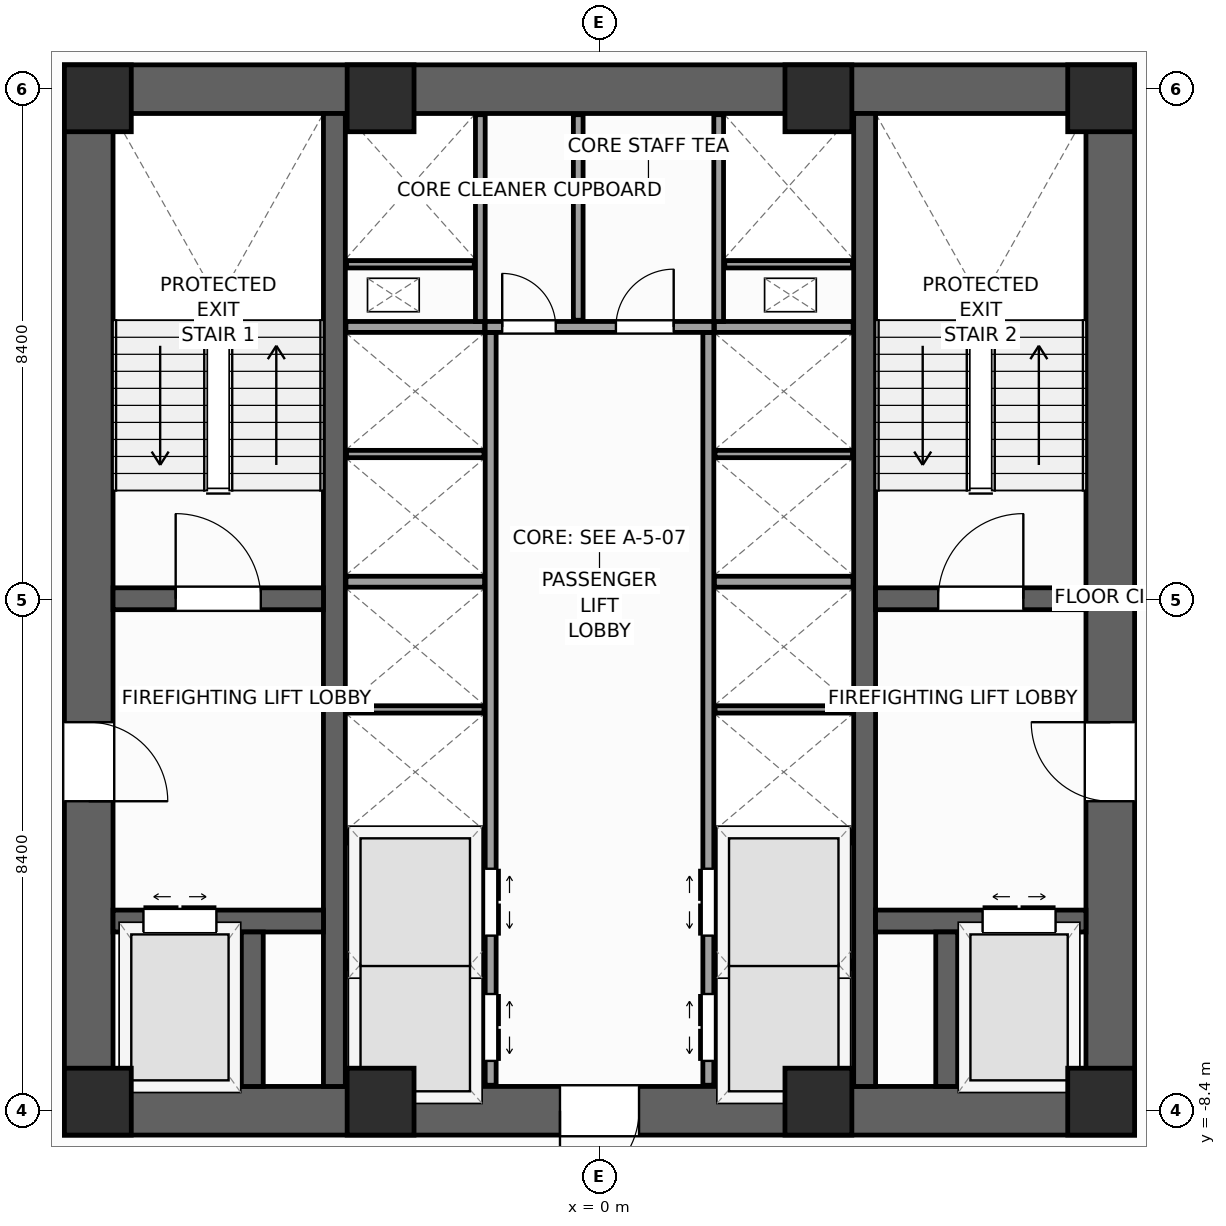
"""IFC4 building model, lengths in metres.
Left out: names, types, materials, properties, quantities, classifications, styles, units other than length and angle.
Written with IfcOpenShell. Run it as: python <this file> out.ifc"""

import sys

from ifc_helpers import new_model, si_unit, direction, frame, frame_2d, origin, origin_2d, place, context, subcontext, project, spatial, rectangle, extrude, source, transform, mapped, element, fill, save


model = new_model("IFC4")
c1 = context("Model", 3, precision=1e-05, world=origin(), true_north=direction((0.0, 1.0)))
c2 = subcontext(c1, "Body", "Model", "MODEL_VIEW")
j1 = project(units=[si_unit("LENGTHUNIT", "METRE"), si_unit("PLANEANGLEUNIT", "RADIAN")], contexts=[c1])
p1 = place(None, origin())
s1 = spatial("IfcSite", under=j1, at=p1, CompositionType="ELEMENT")
p2 = place(p1, origin())
s2 = spatial("IfcBuilding", under=s1, at=p2, CompositionType="ELEMENT")
p3 = place(p2, frame((0.0, 0.0, 26.0)))
s3 = spatial("IfcBuildingStorey", under=s2, at=p3, CompositionType="ELEMENT", Elevation=26.0)
p4 = place(p3, frame((-8.8, -8.4, 0.0), z_axis=(0.0, 0.0, 1.0), x_axis=(1.0, 0.0, 0.0)))
e1 = element("IfcWall", 1, at=p4, inside=s3, PredefinedType="SHEAR", context=c2, shape_type="SweptSolid", body=[
    extrude(rectangle(XDim=17.6, YDim=0.8, at=frame_2d((8.8, 0.0))), origin(), (0.0, 0.0, 1.0), 4.0),
])
p5 = place(p4, frame((8.15, 0.0, 0.0)))
e2 = element("IfcOpeningElement", 2, at=p5, cuts=e1, PredefinedType="OPENING", context=c2, shape_type="SweptSolid", body=[
    extrude(rectangle(XDim=1.3, YDim=2.2, at=frame_2d((0.65, 1.1))), frame((0.0, 0.41, 0.0), z_axis=(0.0, -1.0, 0.0), x_axis=(1.0, 0.0, 0.0)), (0.0, 0.0, 1.0), 0.82),
])
p6 = place(p3, frame((-8.8, 8.4, 0.0), z_axis=(0.0, 0.0, 1.0), x_axis=(1.0, 0.0, 0.0)))
e3 = element("IfcWall", 3, at=p6, inside=s3, PredefinedType="SHEAR", context=c2, shape_type="SweptSolid", body=[
    extrude(rectangle(XDim=17.6, YDim=0.8, at=frame_2d((8.8, 0.0))), origin(), (0.0, 0.0, 1.0), 4.0),
])
p7 = place(p3, frame((-8.4, -8.0, 0.0), z_axis=(0.0, 0.0, 1.0), x_axis=(0.0, 1.0, 0.0)))
e4 = element("IfcWall", 4, at=p7, inside=s3, PredefinedType="SHEAR", context=c2, shape_type="SweptSolid", body=[
    extrude(rectangle(XDim=16.0, YDim=0.8, at=frame_2d((8.0, 0.0))), origin(), (0.0, 0.0, 1.0), 4.0),
])
p8 = place(p7, frame((4.69, 0.0, 0.0)))
e5 = element("IfcOpeningElement", 5, at=p8, cuts=e4, PredefinedType="OPENING", context=c2, shape_type="SweptSolid", body=[
    extrude(rectangle(XDim=1.3, YDim=2.2, at=frame_2d((0.65, 1.1))), frame((0.0, 0.41, 0.0), z_axis=(0.0, -1.0, 0.0), x_axis=(1.0, 0.0, 0.0)), (0.0, 0.0, 1.0), 0.82),
])
p9 = place(p3, frame((8.4, -8.0, 0.0), z_axis=(0.0, 0.0, 1.0), x_axis=(0.0, 1.0, 0.0)))
e6 = element("IfcWall", 6, at=p9, inside=s3, PredefinedType="SHEAR", context=c2, shape_type="SweptSolid", body=[
    extrude(rectangle(XDim=16.0, YDim=0.8, at=frame_2d((8.0, 0.0))), origin(), (0.0, 0.0, 1.0), 4.0),
])
p10 = place(p9, frame((4.69, 0.0, 0.0)))
e7 = element("IfcOpeningElement", 7, at=p10, cuts=e6, PredefinedType="OPENING", context=c2, shape_type="SweptSolid", body=[
    extrude(rectangle(XDim=1.3, YDim=2.2, at=frame_2d((0.65, 1.1))), frame((0.0, 0.41, 0.0), z_axis=(0.0, -1.0, 0.0), x_axis=(1.0, 0.0, 0.0)), (0.0, 0.0, 1.0), 0.82),
])
for number, where, z_axis, x_axis in (
    (8, (-4.36, -8.0, 0.0), (0.0, 0.0, 1.0), (0.0, 1.0, 0.0)),
    (9, (4.36, -8.0, 0.0), (0.0, 0.0, 1.0), (0.0, 1.0, 0.0)),
):
    element("IfcWall", number, at=place(p3, frame(where, z_axis=z_axis, x_axis=x_axis)), inside=s3, PredefinedType="SHEAR", context=c2, shape_type="SweptSolid", body=[
        extrude(rectangle(XDim=16.0, YDim=0.36, at=frame_2d((8.0, 0.0))), origin(), (0.0, 0.0, 1.0), 4.0),
    ])
p11 = place(p3, frame((-8.0, 0.02, 0.0), z_axis=(0.0, 0.0, 1.0), x_axis=(1.0, 0.0, 0.0)))
e10 = element("IfcWall", 10, at=p11, inside=s3, PredefinedType="SHEAR", context=c2, shape_type="SweptSolid", body=[
    extrude(rectangle(XDim=3.46, YDim=0.36, at=frame_2d((1.73, 0.0))), origin(), (0.0, 0.0, 1.0), 4.0),
])
p12 = place(p11, frame((1.03, 0.0, 0.0)))
e11 = element("IfcOpeningElement", 11, at=p12, cuts=e10, PredefinedType="OPENING", context=c2, shape_type="SweptSolid", body=[
    extrude(rectangle(XDim=1.4, YDim=2.2, at=frame_2d((0.7, 1.1))), frame((0.0, 0.19, 0.0), z_axis=(0.0, -1.0, 0.0), x_axis=(1.0, 0.0, 0.0)), (0.0, 0.0, 1.0), 0.38),
])
p13 = place(p3, frame((4.54, 0.02, 0.0), z_axis=(0.0, 0.0, 1.0), x_axis=(1.0, 0.0, 0.0)))
e12 = element("IfcWall", 12, at=p13, inside=s3, PredefinedType="SHEAR", context=c2, shape_type="SweptSolid", body=[
    extrude(rectangle(XDim=3.46, YDim=0.36, at=frame_2d((1.73, 0.0))), origin(), (0.0, 0.0, 1.0), 4.0),
])
p14 = place(p13, frame((1.03, 0.0, 0.0)))
e13 = element("IfcOpeningElement", 13, at=p14, cuts=e12, PredefinedType="OPENING", context=c2, shape_type="SweptSolid", body=[
    extrude(rectangle(XDim=1.4, YDim=2.2, at=frame_2d((0.7, 1.1))), frame((0.0, 0.19, 0.0), z_axis=(0.0, -1.0, 0.0), x_axis=(1.0, 0.0, 0.0)), (0.0, 0.0, 1.0), 0.38),
])
p15 = place(p3, frame((-8.0, -5.28, 0.0), z_axis=(0.0, 0.0, 1.0), x_axis=(1.0, 0.0, 0.0)))
e14 = element("IfcWall", 14, at=p15, inside=s3, PredefinedType="SHEAR", context=c2, shape_type="SweptSolid", body=[
    extrude(rectangle(XDim=3.46, YDim=0.36, at=frame_2d((1.73, 0.0))), origin(), (0.0, 0.0, 1.0), 4.0),
])
p16 = place(p15, frame((0.5, 0.0, 0.0)))
e15 = element("IfcOpeningElement", 15, at=p16, cuts=e14, PredefinedType="OPENING", context=c2, shape_type="SweptSolid", body=[
    extrude(rectangle(XDim=1.2, YDim=2.25, at=frame_2d((0.6, 1.125))), frame((0.0, 0.19, 0.0), z_axis=(0.0, -1.0, 0.0), x_axis=(1.0, 0.0, 0.0)), (0.0, 0.0, 1.0), 0.38),
])
p17 = place(p3, frame((4.54, -5.28, 0.0), z_axis=(0.0, 0.0, 1.0), x_axis=(1.0, 0.0, 0.0)))
e16 = element("IfcWall", 16, at=p17, inside=s3, PredefinedType="SHEAR", context=c2, shape_type="SweptSolid", body=[
    extrude(rectangle(XDim=3.46, YDim=0.36, at=frame_2d((1.73, 0.0))), origin(), (0.0, 0.0, 1.0), 4.0),
])
p18 = place(p17, frame((1.76, 0.0, 0.0)))
e17 = element("IfcOpeningElement", 17, at=p18, cuts=e16, PredefinedType="OPENING", context=c2, shape_type="SweptSolid", body=[
    extrude(rectangle(XDim=1.2, YDim=2.25, at=frame_2d((0.6, 1.125))), frame((0.0, 0.19, 0.0), z_axis=(0.0, -1.0, 0.0), x_axis=(1.0, 0.0, 0.0)), (0.0, 0.0, 1.0), 0.38),
])
for number, where, z_axis, x_axis in (
    (18, (-5.71, -8.0, 0.0), (0.0, 0.0, 1.0), (0.0, 1.0, 0.0)),
    (19, (5.71, -8.0, 0.0), (0.0, 0.0, 1.0), (0.0, 1.0, 0.0)),
):
    element("IfcWall", number, at=place(p3, frame(where, z_axis=z_axis, x_axis=x_axis)), inside=s3, PredefinedType="SHEAR", context=c2, shape_type="SweptSolid", body=[
        extrude(rectangle(XDim=2.54, YDim=0.36, at=frame_2d((1.27, 0.0))), origin(), (0.0, 0.0, 1.0), 4.0),
    ])
m1 = source(origin(), c2, "Body", "SweptSolid", [
    extrude(rectangle(XDim=1.1, YDim=1.1, at=origin_2d()), origin(), (0.0, 0.0, 1.0), 4.0),
])
for number, where, z_axis, x_axis in (
    (20, (-8.25, -8.25, 0.0), (0.0, 0.0, 1.0), (1.0, 0.0, 0.0)),
    (21, (8.25, -8.25, 0.0), (0.0, 0.0, 1.0), (1.0, 0.0, 0.0)),
    (22, (8.25, 8.25, 0.0), (0.0, 0.0, 1.0), (1.0, 0.0, 0.0)),
    (23, (-8.25, 8.25, 0.0), (0.0, 0.0, 1.0), (1.0, 0.0, 0.0)),
    (24, (-3.6, -8.25, 0.0), (0.0, 0.0, 1.0), (1.0, 0.0, 0.0)),
    (25, (3.6, -8.25, 0.0), (0.0, 0.0, 1.0), (1.0, 0.0, 0.0)),
    (26, (-3.6, 8.25, 0.0), (0.0, 0.0, 1.0), (1.0, 0.0, 0.0)),
    (27, (3.6, 8.25, 0.0), (0.0, 0.0, 1.0), (1.0, 0.0, 0.0)),
):
    element("IfcColumn", number, at=place(p3, frame(where, z_axis=z_axis, x_axis=x_axis)), inside=s3, PredefinedType="PILASTER", context=c2, shape_type="MappedRepresentation", body=[
        mapped(m1, transform((0.0, 0.0, 0.0), scale=1.0)),
    ])
p19 = place(p3, frame((-1.79, -7.98, 0.0), z_axis=(0.0, 0.0, 1.0), x_axis=(0.0, 1.0, 0.0)))
e28 = element("IfcWall", 28, at=p19, inside=s3, PredefinedType="PARTITIONING", context=c2, shape_type="SweptSolid", body=[
    extrude(rectangle(XDim=12.38, YDim=0.18, at=frame_2d((6.19, 0.0))), origin(), (0.0, 0.0, 1.0), 3.72),
])
p20 = place(p19, frame((0.4, 0.0, 0.0)))
e29 = element("IfcOpeningElement", 29, at=p20, cuts=e28, PredefinedType="OPENING", context=c2, shape_type="SweptSolid", body=[
    extrude(rectangle(XDim=1.1, YDim=2.2, at=frame_2d((0.55, 1.1))), frame((0.0, 0.1, 0.0), z_axis=(0.0, -1.0, 0.0), x_axis=(1.0, 0.0, 0.0)), (0.0, 0.0, 1.0), 0.2),
])
p21 = place(p19, frame((2.46, 0.0, 0.0)))
e30 = element("IfcOpeningElement", 30, at=p21, cuts=e28, PredefinedType="OPENING", context=c2, shape_type="SweptSolid", body=[
    extrude(rectangle(XDim=1.1, YDim=2.2, at=frame_2d((0.55, 1.1))), frame((0.0, 0.1, 0.0), z_axis=(0.0, -1.0, 0.0), x_axis=(1.0, 0.0, 0.0)), (0.0, 0.0, 1.0), 0.2),
])
p22 = place(p3, frame((1.79, -7.98, 0.0), z_axis=(0.0, 0.0, 1.0), x_axis=(0.0, 1.0, 0.0)))
e31 = element("IfcWall", 31, at=p22, inside=s3, PredefinedType="PARTITIONING", context=c2, shape_type="SweptSolid", body=[
    extrude(rectangle(XDim=12.38, YDim=0.18, at=frame_2d((6.19, 0.0))), origin(), (0.0, 0.0, 1.0), 3.72),
])
p23 = place(p22, frame((0.4, 0.0, 0.0)))
e32 = element("IfcOpeningElement", 32, at=p23, cuts=e31, PredefinedType="OPENING", context=c2, shape_type="SweptSolid", body=[
    extrude(rectangle(XDim=1.1, YDim=2.2, at=frame_2d((0.55, 1.1))), frame((0.0, 0.1, 0.0), z_axis=(0.0, -1.0, 0.0), x_axis=(1.0, 0.0, 0.0)), (0.0, 0.0, 1.0), 0.2),
])
p24 = place(p22, frame((2.46, 0.0, 0.0)))
e33 = element("IfcOpeningElement", 33, at=p24, cuts=e31, PredefinedType="OPENING", context=c2, shape_type="SweptSolid", body=[
    extrude(rectangle(XDim=1.1, YDim=2.2, at=frame_2d((0.55, 1.1))), frame((0.0, 0.1, 0.0), z_axis=(0.0, -1.0, 0.0), x_axis=(1.0, 0.0, 0.0)), (0.0, 0.0, 1.0), 0.2),
])
p25 = place(p3, frame((-1.88, 4.49, 0.0), z_axis=(0.0, 0.0, 1.0), x_axis=(1.0, 0.0, 0.0)))
e34 = element("IfcWall", 34, at=p25, inside=s3, PredefinedType="PARTITIONING", context=c2, shape_type="SweptSolid", body=[
    extrude(rectangle(XDim=3.76, YDim=0.18, at=frame_2d((1.88, 0.0))), origin(), (0.0, 0.0, 1.0), 3.72),
])
p26 = place(p25, frame((0.28, 0.0, 0.0)))
e35 = element("IfcOpeningElement", 35, at=p26, cuts=e34, PredefinedType="OPENING", context=c2, shape_type="SweptSolid", body=[
    extrude(rectangle(XDim=0.88, YDim=2.1, at=frame_2d((0.44, 1.05))), frame((0.0, 0.1, 0.0), z_axis=(0.0, -1.0, 0.0), x_axis=(1.0, 0.0, 0.0)), (0.0, 0.0, 1.0), 0.2),
])
p27 = place(p25, frame((2.15, 0.0, 0.0)))
e36 = element("IfcOpeningElement", 36, at=p27, cuts=e34, PredefinedType="OPENING", context=c2, shape_type="SweptSolid", body=[
    extrude(rectangle(XDim=0.95, YDim=2.1, at=frame_2d((0.475, 1.05))), frame((0.0, 0.1, 0.0), z_axis=(0.0, -1.0, 0.0), x_axis=(1.0, 0.0, 0.0)), (0.0, 0.0, 1.0), 0.2),
])
for number, where, z_axis, x_axis in (
    (37, (-4.17, -3.9, 0.0), (0.0, 0.0, 1.0), (1.0, 0.0, 0.0)),
    (38, (1.89, -3.9, 0.0), (0.0, 0.0, 1.0), (1.0, 0.0, 0.0)),
    (39, (-4.17, 0.3, 0.0), (0.0, 0.0, 1.0), (1.0, 0.0, 0.0)),
    (40, (1.89, 0.3, 0.0), (0.0, 0.0, 1.0), (1.0, 0.0, 0.0)),
    (41, (-4.17, 4.49, 0.0), (0.0, 0.0, 1.0), (1.0, 0.0, 0.0)),
    (42, (1.89, 4.49, 0.0), (0.0, 0.0, 1.0), (1.0, 0.0, 0.0)),
):
    element("IfcWall", number, at=place(p3, frame(where, z_axis=z_axis, x_axis=x_axis)), inside=s3, PredefinedType="PARTITIONING", context=c2, shape_type="SweptSolid", body=[
        extrude(rectangle(XDim=2.28, YDim=0.18, at=frame_2d((1.14, 0.0))), origin(), (0.0, 0.0, 1.0), 3.72),
    ])
for number, where, z_axis, x_axis in (
    (43, (-4.16, -6.0, 0.0), (0.0, 0.0, 1.0), (1.0, 0.0, 0.0)),
    (44, (1.9, -6.0, 0.0), (0.0, 0.0, 1.0), (1.0, 0.0, 0.0)),
    (45, (-4.16, -1.8, 0.0), (0.0, 0.0, 1.0), (1.0, 0.0, 0.0)),
    (46, (1.9, -1.8, 0.0), (0.0, 0.0, 1.0), (1.0, 0.0, 0.0)),
    (47, (-4.16, 2.4, 0.0), (0.0, 0.0, 1.0), (1.0, 0.0, 0.0)),
    (48, (1.9, 2.4, 0.0), (0.0, 0.0, 1.0), (1.0, 0.0, 0.0)),
):
    element("IfcWall", number, at=place(p3, frame(where, z_axis=z_axis, x_axis=x_axis)), inside=s3, PredefinedType="PARTITIONING", context=c2, shape_type="SweptSolid", body=[
        extrude(rectangle(XDim=2.26, YDim=0.12, at=frame_2d((1.13, 0.0))), origin(), (0.0, 0.0, 1.0), 3.72),
    ])
for number, where, z_axis, x_axis in (
    (49, (-1.96, 4.58, 0.0), (0.0, 0.0, 1.0), (0.0, 1.0, 0.0)),
    (50, (1.96, 4.58, 0.0), (0.0, 0.0, 1.0), (0.0, 1.0, 0.0)),
):
    element("IfcWall", number, at=place(p3, frame(where, z_axis=z_axis, x_axis=x_axis)), inside=s3, PredefinedType="PARTITIONING", context=c2, shape_type="SweptSolid", body=[
        extrude(rectangle(XDim=3.4, YDim=0.16, at=frame_2d((1.7, 0.0))), origin(), (0.0, 0.0, 1.0), 3.72),
    ])
for number, where, z_axis, x_axis in (
    (51, (-4.16, 5.52, 0.0), (0.0, 0.0, 1.0), (1.0, 0.0, 0.0)),
    (52, (2.06, 5.52, 0.0), (0.0, 0.0, 1.0), (1.0, 0.0, 0.0)),
):
    element("IfcWall", number, at=place(p3, frame(where, z_axis=z_axis, x_axis=x_axis)), inside=s3, PredefinedType="PARTITIONING", context=c2, shape_type="SweptSolid", body=[
        extrude(rectangle(XDim=2.1, YDim=0.12, at=frame_2d((1.05, 0.0))), origin(), (0.0, 0.0, 1.0), 3.72),
    ])
p28 = place(p3, frame((-0.35, 4.6, 0.0), z_axis=(0.0, 0.0, 1.0), x_axis=(0.0, 1.0, 0.0)))
e53 = element("IfcWall", 53, at=p28, inside=s3, PredefinedType="PARTITIONING", context=c2, shape_type="SweptSolid", body=[
    extrude(rectangle(XDim=3.38, YDim=0.16, at=frame_2d((1.69, 0.0))), origin(), (0.0, 0.0, 1.0), 3.72),
])
m2 = source(origin(), c2, "Body", "SweptSolid", [
    extrude(rectangle(XDim=1.4, YDim=2.2, at=frame_2d((0.7, 1.1))), frame((0.0, 0.025, 0.0), z_axis=(0.0, -1.0, 0.0), x_axis=(1.0, 0.0, 0.0)), (0.0, 0.0, 1.0), 0.05),
])
p29 = place(p12, origin())
e54 = element("IfcDoor", 54, at=p29, inside=s3, OperationType="SINGLE_SWING_LEFT", PredefinedType="DOOR", context=c2, shape_type="MappedRepresentation", body=[
    mapped(m2, transform((0.0, 0.0, 0.0), scale=1.0)),
])
fill(e11, e54)
p30 = place(p14, origin())
e55 = element("IfcDoor", 55, at=p30, inside=s3, OperationType="SINGLE_SWING_RIGHT", PredefinedType="DOOR", context=c2, shape_type="MappedRepresentation", body=[
    mapped(m2, transform((0.0, 0.0, 0.0), scale=1.0)),
])
fill(e13, e55)
m3 = source(origin(), c2, "Body", "SweptSolid", [
    extrude(rectangle(XDim=1.3, YDim=2.2, at=frame_2d((0.65, 1.1))), frame((0.0, 0.025, 0.0), z_axis=(0.0, -1.0, 0.0), x_axis=(1.0, 0.0, 0.0)), (0.0, 0.0, 1.0), 0.05),
])
p31 = place(p8, frame((1.3, 0.0, 0.0), z_axis=(0.0, 0.0, 1.0), x_axis=(-1.0, 0.0, 0.0)))
e56 = element("IfcDoor", 56, at=p31, inside=s3, OperationType="SINGLE_SWING_LEFT", PredefinedType="DOOR", context=c2, shape_type="MappedRepresentation", body=[
    mapped(m3, transform((0.0, 0.0, 0.0), scale=1.0)),
])
fill(e5, e56)
p32 = place(p10, origin())
e57 = element("IfcDoor", 57, at=p32, inside=s3, OperationType="SINGLE_SWING_RIGHT", PredefinedType="DOOR", context=c2, shape_type="MappedRepresentation", body=[
    mapped(m3, transform((0.0, 0.0, 0.0), scale=1.0)),
])
fill(e7, e57)
p33 = place(p5, frame((1.3, 0.0, 0.0), z_axis=(0.0, 0.0, 1.0), x_axis=(-1.0, 0.0, 0.0)))
e58 = element("IfcDoor", 58, at=p33, inside=s3, OperationType="SINGLE_SWING_LEFT", PredefinedType="DOOR", context=c2, shape_type="MappedRepresentation", body=[
    mapped(m3, transform((0.0, 0.0, 0.0), scale=1.0)),
])
fill(e2, e58)
m4 = source(origin(), c2, "Body", "SweptSolid", [
    extrude(rectangle(XDim=1.2, YDim=2.25, at=frame_2d((0.6, 1.125))), frame((0.0, 0.025, 0.0), z_axis=(0.0, -1.0, 0.0), x_axis=(1.0, 0.0, 0.0)), (0.0, 0.0, 1.0), 0.05),
])
p34 = place(p16, origin())
e59 = element("IfcDoor", 59, at=p34, inside=s3, OperationType="DOUBLE_DOOR_SLIDING", PredefinedType="DOOR", context=c2, shape_type="MappedRepresentation", body=[
    mapped(m4, transform((0.0, 0.0, 0.0), scale=1.0)),
])
fill(e15, e59)
p35 = place(p18, origin())
e60 = element("IfcDoor", 60, at=p35, inside=s3, OperationType="DOUBLE_DOOR_SLIDING", PredefinedType="DOOR", context=c2, shape_type="MappedRepresentation", body=[
    mapped(m4, transform((0.0, 0.0, 0.0), scale=1.0)),
])
fill(e17, e60)
m5 = source(origin(), c2, "Body", "SweptSolid", [
    extrude(rectangle(XDim=1.1, YDim=2.2, at=frame_2d((0.55, 1.1))), frame((0.0, 0.025, 0.0), z_axis=(0.0, -1.0, 0.0), x_axis=(1.0, 0.0, 0.0)), (0.0, 0.0, 1.0), 0.05),
])
p36 = place(p20, frame((1.1, 0.0, 0.0), z_axis=(0.0, 0.0, 1.0), x_axis=(-1.0, 0.0, 0.0)))
e61 = element("IfcDoor", 61, at=p36, inside=s3, OperationType="DOUBLE_DOOR_SLIDING", PredefinedType="DOOR", context=c2, shape_type="MappedRepresentation", body=[
    mapped(m5, transform((0.0, 0.0, 0.0), scale=1.0)),
])
fill(e29, e61)
p37 = place(p21, frame((1.1, 0.0, 0.0), z_axis=(0.0, 0.0, 1.0), x_axis=(-1.0, 0.0, 0.0)))
e62 = element("IfcDoor", 62, at=p37, inside=s3, OperationType="DOUBLE_DOOR_SLIDING", PredefinedType="DOOR", context=c2, shape_type="MappedRepresentation", body=[
    mapped(m5, transform((0.0, 0.0, 0.0), scale=1.0)),
])
fill(e30, e62)
p38 = place(p23, origin())
e63 = element("IfcDoor", 63, at=p38, inside=s3, OperationType="DOUBLE_DOOR_SLIDING", PredefinedType="DOOR", context=c2, shape_type="MappedRepresentation", body=[
    mapped(m5, transform((0.0, 0.0, 0.0), scale=1.0)),
])
fill(e32, e63)
p39 = place(p24, origin())
e64 = element("IfcDoor", 64, at=p39, inside=s3, OperationType="DOUBLE_DOOR_SLIDING", PredefinedType="DOOR", context=c2, shape_type="MappedRepresentation", body=[
    mapped(m5, transform((0.0, 0.0, 0.0), scale=1.0)),
])
fill(e33, e64)
m6 = source(origin(), c2, "Body", "SweptSolid", [
    extrude(rectangle(XDim=0.88, YDim=2.1, at=frame_2d((0.44, 1.05))), frame((0.0, 0.025, 0.0), z_axis=(0.0, -1.0, 0.0), x_axis=(1.0, 0.0, 0.0)), (0.0, 0.0, 1.0), 0.05),
])
p40 = place(p26, origin())
e65 = element("IfcDoor", 65, at=p40, inside=s3, OperationType="SINGLE_SWING_LEFT", PredefinedType="DOOR", context=c2, shape_type="MappedRepresentation", body=[
    mapped(m6, transform((0.0, 0.0, 0.0), scale=1.0)),
])
fill(e35, e65)
m7 = source(origin(), c2, "Body", "SweptSolid", [
    extrude(rectangle(XDim=0.95, YDim=2.1, at=frame_2d((0.475, 1.05))), frame((0.0, 0.025, 0.0), z_axis=(0.0, -1.0, 0.0), x_axis=(1.0, 0.0, 0.0)), (0.0, 0.0, 1.0), 0.05),
])
p41 = place(p27, origin())
e66 = element("IfcDoor", 66, at=p41, inside=s3, OperationType="SINGLE_SWING_RIGHT", PredefinedType="DOOR", context=c2, shape_type="MappedRepresentation", body=[
    mapped(m7, transform((0.0, 0.0, 0.0), scale=1.0)),
])
fill(e36, e66)
save(model, sys.argv[1])
